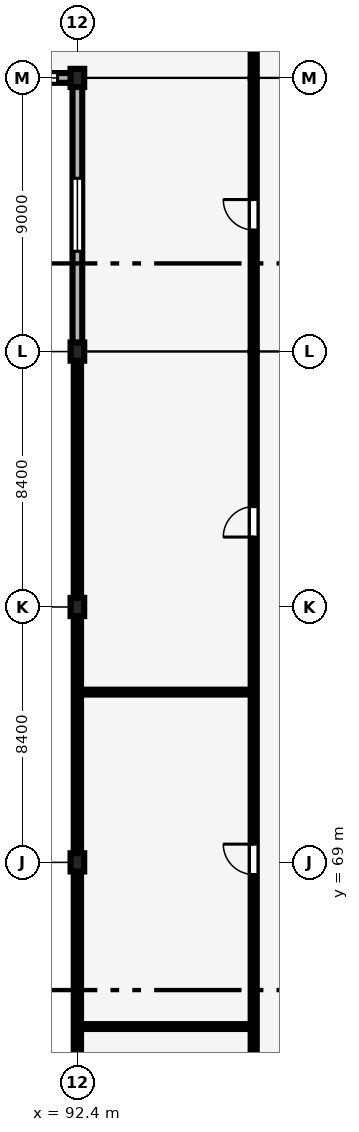
"""IFC4 building model, lengths in metres.
Left out: names, types, materials, properties, quantities, classifications, styles, units other than length and angle.
Written with IfcOpenShell. Run it as: python <this file> out.ifc"""

import sys

from ifc_helpers import new_model, si_unit, direction, frame, frame_2d, origin, origin_2d, place, context, subcontext, project, spatial, rectangle, extrude, element, fill, save


model = new_model("IFC4")
c1 = context("Model", 3, precision=1e-05, world=origin(), true_north=direction((0.0, 1.0)))
c2 = subcontext(c1, "Body", "Model", "MODEL_VIEW")
j1 = project(units=[si_unit("LENGTHUNIT", "METRE"), si_unit("PLANEANGLEUNIT", "RADIAN")], contexts=[c1])
p1 = place(None, origin())
s1 = spatial("IfcSite", under=j1, at=p1, CompositionType="ELEMENT")
p2 = place(p1, origin())
s2 = spatial("IfcBuilding", under=s1, at=p2, CompositionType="ELEMENT")
p3 = place(p2, frame((0.0, 0.0, 13.2)))
s3 = spatial("IfcBuildingStorey", under=s2, at=p3, CompositionType="ELEMENT", Elevation=13.2)
for number, where, z_axis, x_axis in (
    (1, (92.4, 69.0, 0.0), (0.0, 0.0, 1.0), (1.0, 0.0, 0.0)),
    (2, (92.4, 77.4, 0.0), (0.0, 0.0, 1.0), (1.0, 0.0, 0.0)),
    (3, (92.4, 85.8, 0.0), (0.0, 0.0, 1.0), (1.0, 0.0, 0.0)),
    (4, (92.4, 94.8, 0.0), (0.0, 0.0, 1.0), (1.0, 0.0, 0.0)),
):
    element("IfcColumn", number, at=place(p3, frame(where, z_axis=z_axis, x_axis=x_axis)), inside=s3, PredefinedType="COLUMN", context=c2, shape_type="SweptSolid", body=[
        extrude(rectangle(XDim=0.45, YDim=0.6, at=origin_2d()), origin(), (0.0, 0.0, 1.0), 4.2),
    ])
p4 = place(p3, frame((84.225, 94.8, 0.0), z_axis=(0.0, 0.0, 1.0), x_axis=(1.0, 0.0, 0.0)))
e5 = element("IfcWall", 5, at=p4, inside=s3, PredefinedType="SOLIDWALL", context=c2, shape_type="SweptSolid", body=[
    extrude(rectangle(XDim=7.975, YDim=0.32, at=frame_2d((3.987, 0.0))), origin(), (0.0, 0.0, 1.0), 3.48),
])
p5 = place(p4, frame((0.45, 0.0, 0.9)))
e6 = element("IfcOpeningElement", 6, at=p5, cuts=e5, PredefinedType="OPENING", context=c2, shape_type="SweptSolid", body=[
    extrude(rectangle(XDim=1.68, YDim=2.4, at=frame_2d((0.84, 1.2))), frame((0.0, 0.17, 0.0), z_axis=(0.0, -1.0, 0.0), x_axis=(1.0, 0.0, 0.0)), (0.0, 0.0, 1.0), 0.34),
])
p6 = place(p4, frame((6.325, 0.0, 0.9)))
e7 = element("IfcOpeningElement", 7, at=p6, cuts=e5, PredefinedType="OPENING", context=c2, shape_type="SweptSolid", body=[
    extrude(rectangle(XDim=1.2, YDim=1.5, at=frame_2d((0.6, 0.75))), frame((0.0, 0.17, 0.0), z_axis=(0.0, -1.0, 0.0), x_axis=(1.0, 0.0, 0.0)), (0.0, 0.0, 1.0), 0.34),
])
p7 = place(p3, frame((92.4, 86.075, 0.0), z_axis=(0.0, 0.0, 1.0), x_axis=(0.0, 1.0, 0.0)))
e8 = element("IfcWall", 8, at=p7, inside=s3, PredefinedType="SOLIDWALL", context=c2, shape_type="SweptSolid", body=[
    extrude(rectangle(XDim=8.45, YDim=0.32, at=frame_2d((4.225, 0.0))), origin(), (0.0, 0.0, 1.0), 3.48),
])
p8 = place(p7, frame((3.025, 0.0, 0.9)))
e9 = element("IfcOpeningElement", 9, at=p8, cuts=e8, PredefinedType="OPENING", context=c2, shape_type="SweptSolid", body=[
    extrude(rectangle(XDim=2.4, YDim=1.8, at=frame_2d((1.2, 0.9))), frame((0.0, 0.17, 0.0), z_axis=(0.0, -1.0, 0.0), x_axis=(1.0, 0.0, 0.0)), (0.0, 0.0, 1.0), 0.34),
])
for number, where, z_axis, x_axis in (
    (10, (92.4, 60.875, 0.0), (0.0, 0.0, 1.0), (0.0, 1.0, 0.0)),
    (11, (92.4, 69.275, 0.0), (0.0, 0.0, 1.0), (0.0, 1.0, 0.0)),
):
    element("IfcWall", number, at=place(p3, frame(where, z_axis=z_axis, x_axis=x_axis)), inside=s3, PredefinedType="SOLIDWALL", context=c2, shape_type="SweptSolid", body=[
        extrude(rectangle(XDim=7.85, YDim=0.24, at=frame_2d((3.925, 0.0))), origin(), (0.0, 0.0, 1.0), 1.15),
    ])
p9 = place(p3, frame((92.4, 77.675, 0.0), z_axis=(0.0, 0.0, 1.0), x_axis=(0.0, 1.0, 0.0)))
e12 = element("IfcWall", 12, at=p9, inside=s3, PredefinedType="SOLIDWALL", context=c2, shape_type="SweptSolid", body=[
    extrude(rectangle(XDim=7.85, YDim=0.24, at=frame_2d((3.925, 0.0))), origin(), (0.0, 0.0, 1.0), 1.15),
])
p10 = place(p3, frame((98.2, 94.81, 0.0), z_axis=(0.0, 0.0, 1.0), x_axis=(0.0, 1.0, 0.0)))
e13 = element("IfcWall", 13, at=p10, inside=s3, PredefinedType="PARTITIONING", context=c2, shape_type="SweptSolid", body=[
    extrude(rectangle(XDim=6.085, YDim=0.2, at=frame_2d((3.042, 0.0))), origin(), (0.0, 0.0, 1.0), 3.9),
])
p11 = place(p3, frame((98.2, 85.81, 0.0), z_axis=(0.0, 0.0, 1.0), x_axis=(0.0, 1.0, 0.0)))
e14 = element("IfcWall", 14, at=p11, inside=s3, PredefinedType="PARTITIONING", context=c2, shape_type="SweptSolid", body=[
    extrude(rectangle(XDim=8.98, YDim=0.2, at=frame_2d((4.49, 0.0))), origin(), (0.0, 0.0, 1.0), 3.9),
])
p12 = place(p11, frame((3.99, 0.0, 0.0)))
e15 = element("IfcOpeningElement", 15, at=p12, cuts=e14, PredefinedType="OPENING", context=c2, shape_type="SweptSolid", body=[
    extrude(rectangle(XDim=1.0, YDim=2.15, at=frame_2d((0.5, 1.075))), frame((0.0, 0.11, 0.0), z_axis=(0.0, -1.0, 0.0), x_axis=(1.0, 0.0, 0.0)), (0.0, 0.0, 1.0), 0.22),
])
for number, where, z_axis, x_axis in (
    (16, (92.525, 63.6, 0.0), (0.0, 0.0, 1.0), (1.0, 0.0, 0.0)),
    (17, (92.525, 74.6, 0.0), (0.0, 0.0, 1.0), (1.0, 0.0, 0.0)),
):
    element("IfcWall", number, at=place(p3, frame(where, z_axis=z_axis, x_axis=x_axis)), inside=s3, PredefinedType="PARTITIONING", context=c2, shape_type="SweptSolid", body=[
        extrude(rectangle(XDim=5.57, YDim=0.16, at=frame_2d((2.785, 0.0))), origin(), (0.0, 0.0, 1.0), 3.46),
    ])
p13 = place(p3, frame((98.2, 35.565, 0.0), z_axis=(0.0, 0.0, 1.0), x_axis=(0.0, 1.0, 0.0)))
e18 = element("IfcWall", 18, at=p13, inside=s3, PredefinedType="PARTITIONING", context=c2, shape_type="SweptSolid", body=[
    extrude(rectangle(XDim=50.225, YDim=0.2, at=frame_2d((25.113, 0.0))), origin(), (0.0, 0.0, 1.0), 3.9),
])
p14 = place(p13, frame((5.035, 0.0, 0.0)))
e19 = element("IfcOpeningElement", 19, at=p14, cuts=e18, PredefinedType="OPENING", context=c2, shape_type="SweptSolid", body=[
    extrude(rectangle(XDim=1.0, YDim=2.15, at=frame_2d((0.5, 1.075))), frame((0.0, 0.11, 0.0), z_axis=(0.0, -1.0, 0.0), x_axis=(1.0, 0.0, 0.0)), (0.0, 0.0, 1.0), 0.22),
])
p15 = place(p13, frame((13.56, 0.0, 0.0)))
e20 = element("IfcOpeningElement", 20, at=p15, cuts=e18, PredefinedType="OPENING", context=c2, shape_type="SweptSolid", body=[
    extrude(rectangle(XDim=0.95, YDim=2.2, at=frame_2d((0.475, 1.1))), frame((0.0, 0.11, 0.0), z_axis=(0.0, -1.0, 0.0), x_axis=(1.0, 0.0, 0.0)), (0.0, 0.0, 1.0), 0.22),
])
p16 = place(p13, frame((19.16, 0.0, 0.0)))
e21 = element("IfcOpeningElement", 21, at=p16, cuts=e18, PredefinedType="OPENING", context=c2, shape_type="SweptSolid", body=[
    extrude(rectangle(XDim=0.95, YDim=2.2, at=frame_2d((0.475, 1.1))), frame((0.0, 0.11, 0.0), z_axis=(0.0, -1.0, 0.0), x_axis=(1.0, 0.0, 0.0)), (0.0, 0.0, 1.0), 0.22),
])
p17 = place(p13, frame((24.76, 0.0, 0.0)))
e22 = element("IfcOpeningElement", 22, at=p17, cuts=e18, PredefinedType="OPENING", context=c2, shape_type="SweptSolid", body=[
    extrude(rectangle(XDim=0.95, YDim=2.1, at=frame_2d((0.475, 1.05))), frame((0.0, 0.11, 0.0), z_axis=(0.0, -1.0, 0.0), x_axis=(1.0, 0.0, 0.0)), (0.0, 0.0, 1.0), 0.22),
])
p18 = place(p13, frame((33.035, 0.0, 0.0)))
e23 = element("IfcOpeningElement", 23, at=p18, cuts=e18, PredefinedType="OPENING", context=c2, shape_type="SweptSolid", body=[
    extrude(rectangle(XDim=1.0, YDim=2.15, at=frame_2d((0.5, 1.075))), frame((0.0, 0.11, 0.0), z_axis=(0.0, -1.0, 0.0), x_axis=(1.0, 0.0, 0.0)), (0.0, 0.0, 1.0), 0.22),
])
p19 = place(p13, frame((44.135, 0.0, 0.0)))
e24 = element("IfcOpeningElement", 24, at=p19, cuts=e18, PredefinedType="OPENING", context=c2, shape_type="SweptSolid", body=[
    extrude(rectangle(XDim=1.0, YDim=2.15, at=frame_2d((0.5, 1.075))), frame((0.0, 0.11, 0.0), z_axis=(0.0, -1.0, 0.0), x_axis=(1.0, 0.0, 0.0)), (0.0, 0.0, 1.0), 0.22),
])
p20 = place(p6, origin())
e25 = element("IfcWindow", 25, at=p20, inside=s3, PartitioningType="SINGLE_PANEL", PredefinedType="WINDOW", context=c2, shape_type="SweptSolid", body=[
    extrude(rectangle(XDim=1.2, YDim=1.5, at=frame_2d((0.6, 0.75))), frame((0.0, 0.03, 0.0), z_axis=(0.0, -1.0, 0.0), x_axis=(1.0, 0.0, 0.0)), (0.0, 0.0, 1.0), 0.06),
])
fill(e7, e25)
p21 = place(p8, origin())
e26 = element("IfcWindow", 26, at=p21, inside=s3, PartitioningType="SINGLE_PANEL", PredefinedType="WINDOW", context=c2, shape_type="SweptSolid", body=[
    extrude(rectangle(XDim=2.4, YDim=1.8, at=frame_2d((1.2, 0.9))), frame((0.0, 0.03, 0.0), z_axis=(0.0, -1.0, 0.0), x_axis=(1.0, 0.0, 0.0)), (0.0, 0.0, 1.0), 0.06),
])
fill(e9, e26)
p22 = place(p12, origin())
e27 = element("IfcDoor", 27, at=p22, inside=s3, OperationType="SINGLE_SWING_RIGHT", PredefinedType="DOOR", context=c2, shape_type="SweptSolid", body=[
    extrude(rectangle(XDim=1.0, YDim=2.15, at=frame_2d((0.5, 1.075))), frame((0.0, 0.025, 0.0), z_axis=(0.0, -1.0, 0.0), x_axis=(1.0, 0.0, 0.0)), (0.0, 0.0, 1.0), 0.05),
])
fill(e15, e27)
p23 = place(p18, origin())
e28 = element("IfcDoor", 28, at=p23, inside=s3, OperationType="SINGLE_SWING_RIGHT", PredefinedType="DOOR", context=c2, shape_type="SweptSolid", body=[
    extrude(rectangle(XDim=1.0, YDim=2.15, at=frame_2d((0.5, 1.075))), frame((0.0, 0.025, 0.0), z_axis=(0.0, -1.0, 0.0), x_axis=(1.0, 0.0, 0.0)), (0.0, 0.0, 1.0), 0.05),
])
fill(e23, e28)
p24 = place(p19, origin())
e29 = element("IfcDoor", 29, at=p24, inside=s3, OperationType="SINGLE_SWING_LEFT", PredefinedType="DOOR", context=c2, shape_type="SweptSolid", body=[
    extrude(rectangle(XDim=1.0, YDim=2.15, at=frame_2d((0.5, 1.075))), frame((0.0, 0.025, 0.0), z_axis=(0.0, -1.0, 0.0), x_axis=(1.0, 0.0, 0.0)), (0.0, 0.0, 1.0), 0.05),
])
fill(e24, e29)
save(model, sys.argv[1])
